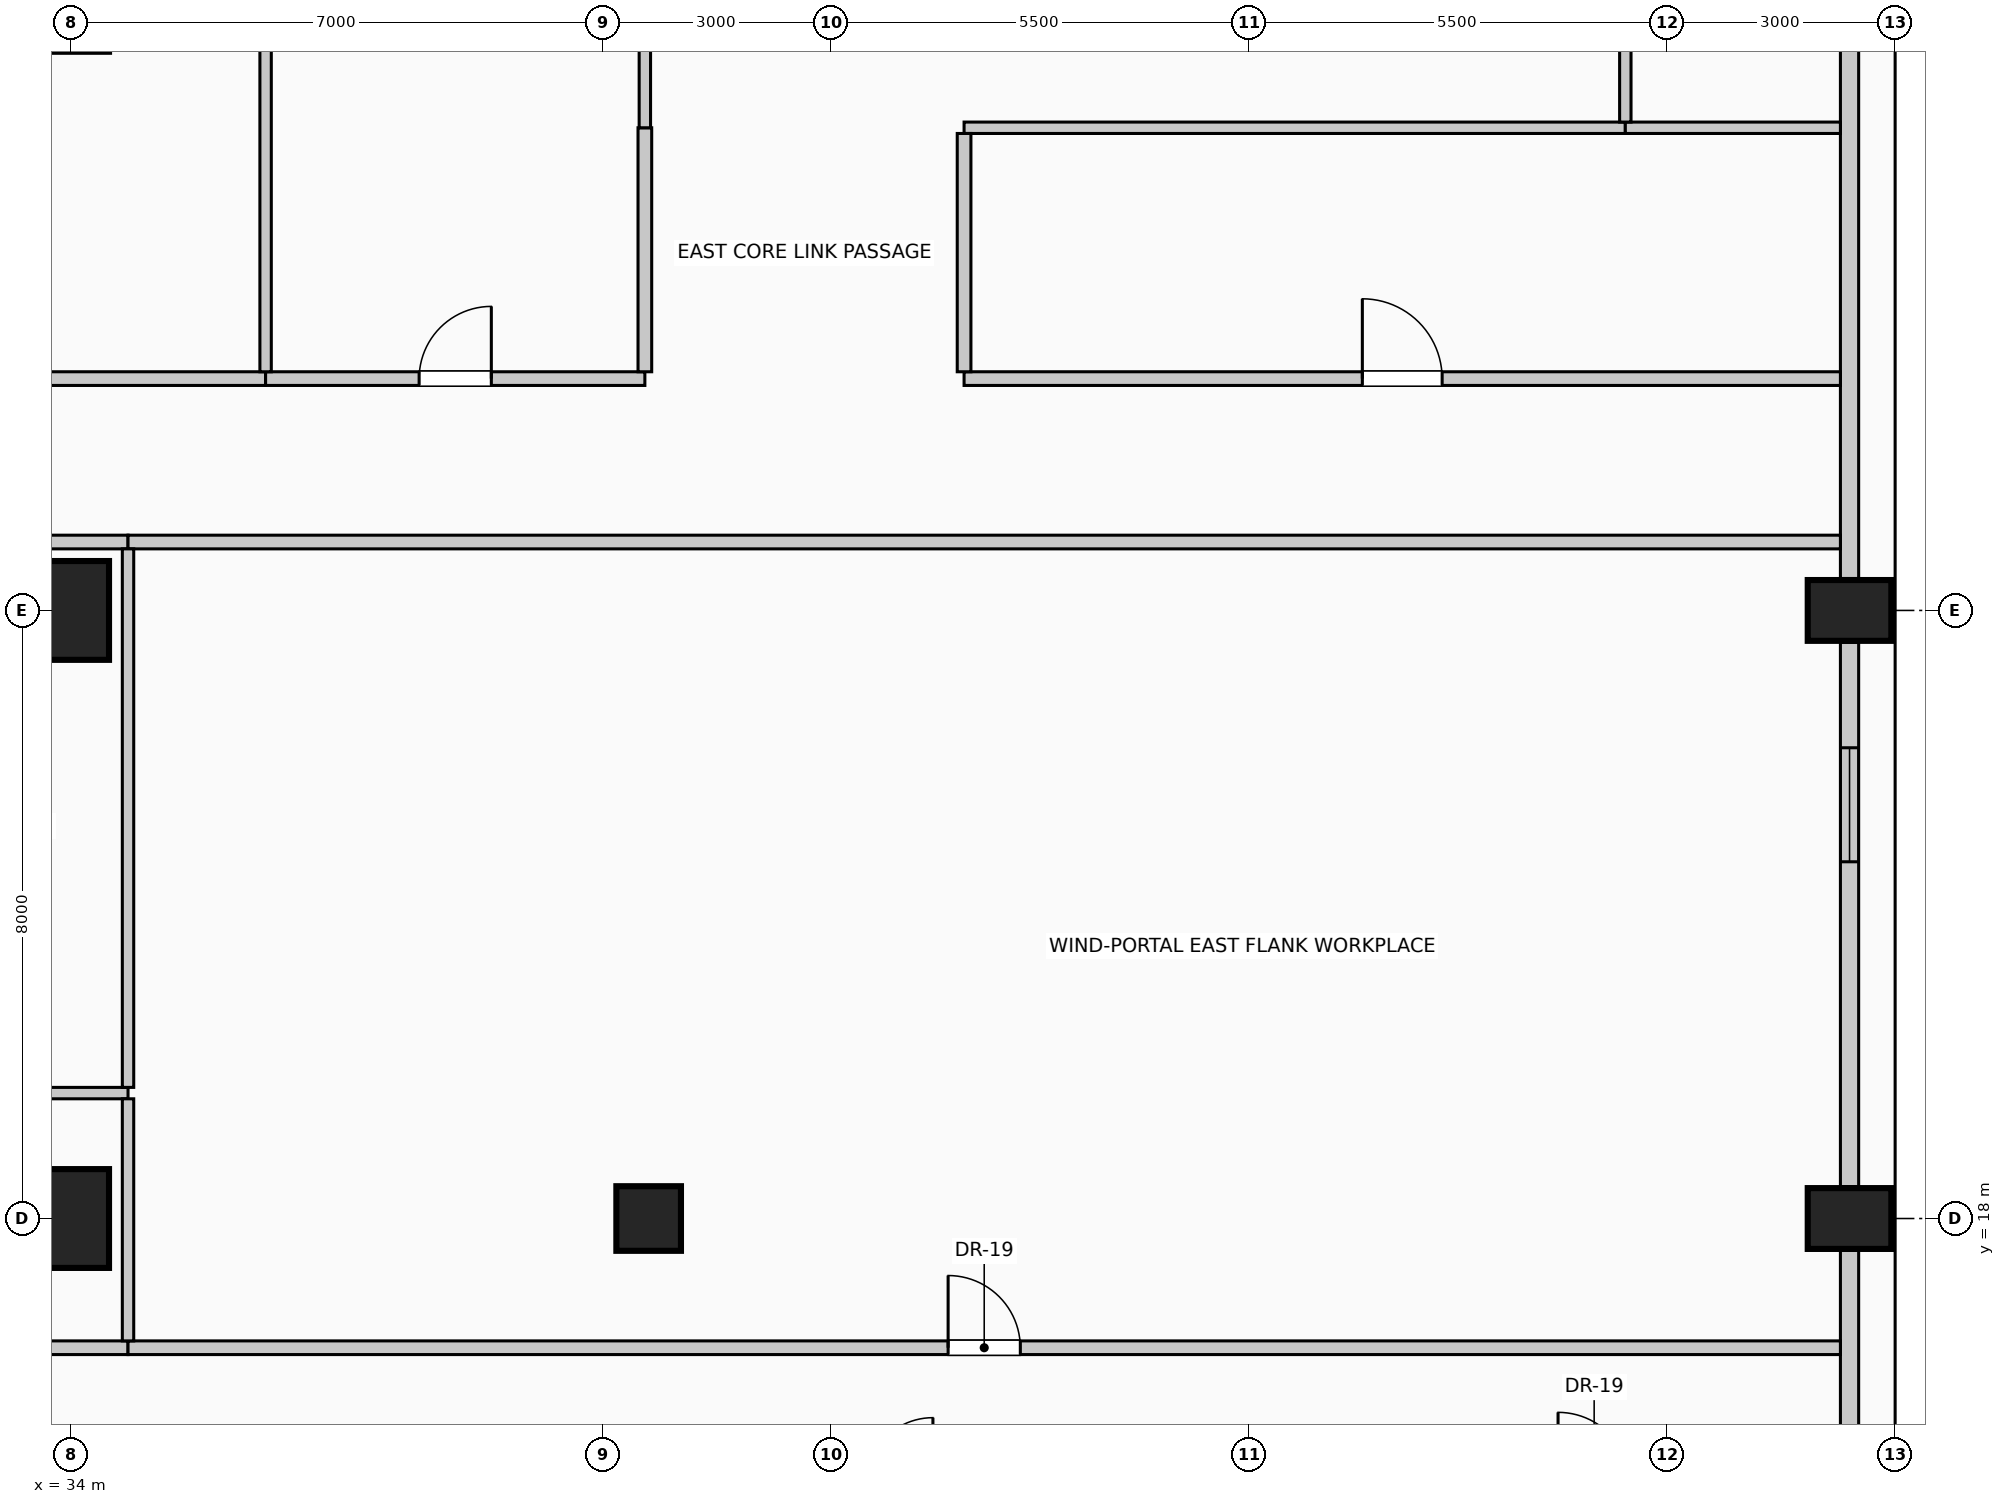
"""IFC4 building model, lengths in metres.
Left out: names, types, materials, properties, quantities, classifications, styles, units other than length and angle.
Written with IfcOpenShell. Run it as: python <this file> out.ifc"""

import sys

from ifc_helpers import new_model, si_unit, direction, frame, frame_2d, origin, origin_2d, place, context, subcontext, project, spatial, rectangle, circle, extrude, element, fill, save


model = new_model("IFC4")
c1 = context("Model", 3, precision=1e-05, world=origin(), true_north=direction((0.0, 1.0)))
c2 = subcontext(c1, "Body", "Model", "MODEL_VIEW")
j1 = project(units=[si_unit("LENGTHUNIT", "METRE"), si_unit("PLANEANGLEUNIT", "RADIAN")], contexts=[c1])
p1 = place(None, origin())
s1 = spatial("IfcSite", under=j1, at=p1, CompositionType="ELEMENT")
p2 = place(p1, origin())
s2 = spatial("IfcBuilding", under=s1, at=p2, CompositionType="ELEMENT")
p3 = place(p2, frame((0.0, 0.0, 218.6)))
s3 = spatial("IfcBuildingStorey", under=s2, at=p3, CompositionType="ELEMENT", Elevation=218.6)
for number, where, z_axis, x_axis in (
    (1, (57.4, 18.0, 0.0), (0.0, 0.0, 1.0), (0.0, 1.0, 0.0)),
    (2, (57.4, 26.0, 0.0), (0.0, 0.0, 1.0), (0.0, 1.0, 0.0)),
):
    element("IfcColumn", number, at=place(p3, frame(where, z_axis=z_axis, x_axis=x_axis)), inside=s3, PredefinedType="COLUMN", context=c2, shape_type="SweptSolid", body=[
        extrude(rectangle(XDim=0.8, YDim=1.1, at=origin_2d()), origin(), (0.0, 0.0, 1.0), 4.0),
    ])
for number, where, z_axis, x_axis in (
    (3, (34.0, 18.0, 0.0), (0.0, 0.0, 1.0), (1.0, 0.0, 0.0)),
    (4, (34.0, 26.0, 0.0), (0.0, 0.0, 1.0), (1.0, 0.0, 0.0)),
    (5, (34.0, 34.0, 0.0), (0.0, 0.0, 1.0), (1.0, 0.0, 0.0)),
):
    element("IfcColumn", number, at=place(p3, frame(where, z_axis=z_axis, x_axis=x_axis)), inside=s3, PredefinedType="COLUMN", context=c2, shape_type="SweptSolid", body=[
        extrude(rectangle(XDim=1.0, YDim=1.3, at=origin_2d()), origin(), (0.0, 0.0, 1.0), 4.0),
    ])
p4 = place(p3, frame((41.6, 18.0, 0.0), z_axis=(0.0, 0.0, 1.0), x_axis=(1.0, 0.0, 0.0)))
e6 = element("IfcColumn", 6, at=p4, inside=s3, PredefinedType="COLUMN", context=c2, shape_type="SweptSolid", body=[
    extrude(circle(Radius=0.425, at=origin_2d()), origin(), (0.0, 0.0, 1.0), 4.0),
])
p5 = place(p3, frame((57.4, 17.58, 0.0), z_axis=(0.0, 0.0, 1.0), x_axis=(0.0, -1.0, 0.0)))
e7 = element("IfcWall", 7, at=p5, inside=s3, PredefinedType="SOLIDWALL", context=c2, shape_type="SweptSolid", body=[
    extrude(rectangle(XDim=7.16, YDim=0.24, at=frame_2d((3.58, 0.0))), origin(), (0.0, 0.0, 1.0), 3.0),
])
p6 = place(p5, frame((4.273, 0.0, 0.42)))
e8 = element("IfcOpeningElement", 8, at=p6, cuts=e7, PredefinedType="OPENING", context=c2, shape_type="SweptSolid", body=[
    extrude(rectangle(XDim=1.5, YDim=2.2, at=frame_2d((0.75, 1.1))), frame((0.0, 0.13, 0.0), z_axis=(0.0, -1.0, 0.0), x_axis=(1.0, 0.0, 0.0)), (0.0, 0.0, 1.0), 0.26),
])
p7 = place(p3, frame((57.4, 25.58, 0.0), z_axis=(0.0, 0.0, 1.0), x_axis=(0.0, -1.0, 0.0)))
e9 = element("IfcWall", 9, at=p7, inside=s3, PredefinedType="SOLIDWALL", context=c2, shape_type="SweptSolid", body=[
    extrude(rectangle(XDim=7.16, YDim=0.24, at=frame_2d((3.58, 0.0))), origin(), (0.0, 0.0, 1.0), 3.0),
])
p8 = place(p7, frame((1.387, 0.0, 0.42)))
e10 = element("IfcOpeningElement", 10, at=p8, cuts=e9, PredefinedType="OPENING", context=c2, shape_type="SweptSolid", body=[
    extrude(rectangle(XDim=1.5, YDim=2.2, at=frame_2d((0.75, 1.1))), frame((0.0, 0.13, 0.0), z_axis=(0.0, -1.0, 0.0), x_axis=(1.0, 0.0, 0.0)), (0.0, 0.0, 1.0), 0.26),
])
p9 = place(p3, frame((57.4, 33.58, 0.0), z_axis=(0.0, 0.0, 1.0), x_axis=(0.0, -1.0, 0.0)))
e11 = element("IfcWall", 11, at=p9, inside=s3, PredefinedType="SOLIDWALL", context=c2, shape_type="SweptSolid", body=[
    extrude(rectangle(XDim=7.16, YDim=0.24, at=frame_2d((3.58, 0.0))), origin(), (0.0, 0.0, 1.0), 3.0),
])
p10 = place(p3, frame((23.1, 16.3, 0.0), z_axis=(0.0, 0.0, 1.0), x_axis=(1.0, 0.0, 0.0)))
e12 = element("IfcWall", 12, at=p10, inside=s3, PredefinedType="PARTITIONING", context=c2, shape_type="SweptSolid", body=[
    extrude(rectangle(XDim=11.65, YDim=0.18, at=frame_2d((5.825, 0.0))), origin(), (0.0, 0.0, 1.0), 3.75),
])
p11 = place(p3, frame((34.75, 16.3, 0.0), z_axis=(0.0, 0.0, 1.0), x_axis=(1.0, 0.0, 0.0)))
e13 = element("IfcWall", 13, at=p11, inside=s3, PredefinedType="PARTITIONING", context=c2, shape_type="SweptSolid", body=[
    extrude(rectangle(XDim=22.53, YDim=0.18, at=frame_2d((11.265, 0.0))), origin(), (0.0, 0.0, 1.0), 3.75),
])
p12 = place(p11, frame((10.79, 0.0, 0.0)))
e14 = element("IfcOpeningElement", 14, at=p12, cuts=e13, PredefinedType="OPENING", context=c2, shape_type="SweptSolid", body=[
    extrude(rectangle(XDim=0.95, YDim=2.15, at=frame_2d((0.475, 1.075))), frame((0.0, 0.1, 0.0), z_axis=(0.0, -1.0, 0.0), x_axis=(1.0, 0.0, 0.0)), (0.0, 0.0, 1.0), 0.2),
])
p13 = place(p3, frame((23.1, 19.65, 0.0), z_axis=(0.0, 0.0, 1.0), x_axis=(1.0, 0.0, 0.0)))
e15 = element("IfcWall", 15, at=p13, inside=s3, PredefinedType="PARTITIONING", context=c2, shape_type="SweptSolid", body=[
    extrude(rectangle(XDim=11.65, YDim=0.15, at=frame_2d((5.825, 0.0))), origin(), (0.0, 0.0, 1.0), 3.75),
])
p14 = place(p3, frame((23.1, 26.9, 0.0), z_axis=(0.0, 0.0, 1.0), x_axis=(1.0, 0.0, 0.0)))
e16 = element("IfcWall", 16, at=p14, inside=s3, PredefinedType="PARTITIONING", context=c2, shape_type="SweptSolid", body=[
    extrude(rectangle(XDim=11.65, YDim=0.18, at=frame_2d((5.825, 0.0))), origin(), (0.0, 0.0, 1.0), 3.75),
])
p15 = place(p14, frame((5.3, 0.0, 0.0)))
e17 = element("IfcOpeningElement", 17, at=p15, cuts=e16, PredefinedType="OPENING", context=c2, shape_type="SweptSolid", body=[
    extrude(rectangle(XDim=1.05, YDim=2.15, at=frame_2d((0.525, 1.075))), frame((0.0, 0.1, 0.0), z_axis=(0.0, -1.0, 0.0), x_axis=(1.0, 0.0, 0.0)), (0.0, 0.0, 1.0), 0.2),
])
p16 = place(p3, frame((34.75, 26.9, 0.0), z_axis=(0.0, 0.0, 1.0), x_axis=(1.0, 0.0, 0.0)))
e18 = element("IfcWall", 18, at=p16, inside=s3, PredefinedType="PARTITIONING", context=c2, shape_type="SweptSolid", body=[
    extrude(rectangle(XDim=22.53, YDim=0.18, at=frame_2d((11.265, 0.0))), origin(), (0.0, 0.0, 1.0), 3.75),
])
p17 = place(p3, frame((28.09, 29.05, 0.0), z_axis=(0.0, 0.0, 1.0), x_axis=(1.0, 0.0, 0.0)))
e19 = element("IfcWall", 19, at=p17, inside=s3, PredefinedType="PARTITIONING", context=c2, shape_type="SweptSolid", body=[
    extrude(rectangle(XDim=8.47, YDim=0.18, at=frame_2d((4.235, 0.0))), origin(), (0.0, 0.0, 1.0), 3.75),
])
p18 = place(p17, frame((3.71, 0.0, 0.0)))
e20 = element("IfcOpeningElement", 20, at=p18, cuts=e19, PredefinedType="OPENING", context=c2, shape_type="SweptSolid", body=[
    extrude(rectangle(XDim=1.05, YDim=2.15, at=frame_2d((0.525, 1.075))), frame((0.0, 0.1, 0.0), z_axis=(0.0, -1.0, 0.0), x_axis=(1.0, 0.0, 0.0)), (0.0, 0.0, 1.0), 0.2),
])
p19 = place(p3, frame((36.56, 29.05, 0.0), z_axis=(0.0, 0.0, 1.0), x_axis=(1.0, 0.0, 0.0)))
e21 = element("IfcWall", 21, at=p19, inside=s3, PredefinedType="PARTITIONING", context=c2, shape_type="SweptSolid", body=[
    extrude(rectangle(XDim=4.99, YDim=0.18, at=frame_2d((2.495, 0.0))), origin(), (0.0, 0.0, 1.0), 3.75),
])
p20 = place(p19, frame((2.02, 0.0, 0.0)))
e22 = element("IfcOpeningElement", 22, at=p20, cuts=e21, PredefinedType="OPENING", context=c2, shape_type="SweptSolid", body=[
    extrude(rectangle(XDim=0.95, YDim=2.15, at=frame_2d((0.475, 1.075))), frame((0.0, 0.1, 0.0), z_axis=(0.0, -1.0, 0.0), x_axis=(1.0, 0.0, 0.0)), (0.0, 0.0, 1.0), 0.2),
])
p21 = place(p3, frame((45.75, 29.05, 0.0), z_axis=(0.0, 0.0, 1.0), x_axis=(1.0, 0.0, 0.0)))
e23 = element("IfcWall", 23, at=p21, inside=s3, PredefinedType="PARTITIONING", context=c2, shape_type="SweptSolid", body=[
    extrude(rectangle(XDim=11.53, YDim=0.18, at=frame_2d((5.765, 0.0))), origin(), (0.0, 0.0, 1.0), 3.75),
])
p22 = place(p21, frame((5.24, 0.0, 0.0)))
e24 = element("IfcOpeningElement", 24, at=p22, cuts=e23, PredefinedType="OPENING", context=c2, shape_type="SweptSolid", body=[
    extrude(rectangle(XDim=1.05, YDim=2.15, at=frame_2d((0.525, 1.075))), frame((0.0, 0.1, 0.0), z_axis=(0.0, -1.0, 0.0), x_axis=(1.0, 0.0, 0.0)), (0.0, 0.0, 1.0), 0.2),
])
p23 = place(p3, frame((45.75, 32.35, 0.0), z_axis=(0.0, 0.0, 1.0), x_axis=(1.0, 0.0, 0.0)))
e25 = element("IfcWall", 25, at=p23, inside=s3, PredefinedType="PARTITIONING", context=c2, shape_type="SweptSolid", body=[
    extrude(rectangle(XDim=8.7, YDim=0.15, at=frame_2d((4.35, 0.0))), origin(), (0.0, 0.0, 1.0), 3.75),
])
p24 = place(p3, frame((54.45, 32.35, 0.0), z_axis=(0.0, 0.0, 1.0), x_axis=(1.0, 0.0, 0.0)))
e26 = element("IfcWall", 26, at=p24, inside=s3, PredefinedType="PARTITIONING", context=c2, shape_type="SweptSolid", body=[
    extrude(rectangle(XDim=2.83, YDim=0.15, at=frame_2d((1.415, 0.0))), origin(), (0.0, 0.0, 1.0), 3.75),
])
p25 = place(p3, frame((34.75, 16.39, 0.0), z_axis=(0.0, 0.0, 1.0), x_axis=(0.0, 1.0, 0.0)))
e27 = element("IfcWall", 27, at=p25, inside=s3, PredefinedType="PARTITIONING", context=c2, shape_type="SweptSolid", body=[
    extrude(rectangle(XDim=3.185, YDim=0.15, at=frame_2d((1.593, 0.0))), origin(), (0.0, 0.0, 1.0), 3.75),
])
p26 = place(p3, frame((34.75, 19.725, 0.0), z_axis=(0.0, 0.0, 1.0), x_axis=(0.0, 1.0, 0.0)))
e28 = element("IfcWall", 28, at=p26, inside=s3, PredefinedType="PARTITIONING", context=c2, shape_type="SweptSolid", body=[
    extrude(rectangle(XDim=7.085, YDim=0.15, at=frame_2d((3.542, 0.0))), origin(), (0.0, 0.0, 1.0), 3.75),
])
p27 = place(p3, frame((36.56, 29.14, 0.0), z_axis=(0.0, 0.0, 1.0), x_axis=(0.0, 1.0, 0.0)))
e29 = element("IfcWall", 29, at=p27, inside=s3, PredefinedType="PARTITIONING", context=c2, shape_type="SweptSolid", body=[
    extrude(rectangle(XDim=16.14, YDim=0.15, at=frame_2d((8.07, 0.0))), origin(), (0.0, 0.0, 1.0), 3.75),
])
p28 = place(p3, frame((41.55, 29.14, 0.0), z_axis=(0.0, 0.0, 1.0), x_axis=(0.0, 1.0, 0.0)))
e30 = element("IfcWall", 30, at=p28, inside=s3, PredefinedType="PARTITIONING", context=c2, shape_type="SweptSolid", body=[
    extrude(rectangle(XDim=3.21, YDim=0.18, at=frame_2d((1.605, 0.0))), origin(), (0.0, 0.0, 1.0), 3.145),
])
p29 = place(p3, frame((41.55, 32.35, 0.0), z_axis=(0.0, 0.0, 1.0), x_axis=(0.0, 1.0, 0.0)))
e31 = element("IfcWall", 31, at=p29, inside=s3, PredefinedType="PARTITIONING", context=c2, shape_type="SweptSolid", body=[
    extrude(rectangle(XDim=1.225, YDim=0.15, at=frame_2d((0.612, 0.0))), origin(), (0.0, 0.0, 1.0), 3.145),
])
p30 = place(p3, frame((45.75, 29.14, 0.0), z_axis=(0.0, 0.0, 1.0), x_axis=(0.0, 1.0, 0.0)))
e32 = element("IfcWall", 32, at=p30, inside=s3, PredefinedType="PARTITIONING", context=c2, shape_type="SweptSolid", body=[
    extrude(rectangle(XDim=3.135, YDim=0.18, at=frame_2d((1.567, 0.0))), origin(), (0.0, 0.0, 1.0), 3.75),
])
p31 = place(p3, frame((54.45, 32.425, 0.0), z_axis=(0.0, 0.0, 1.0), x_axis=(0.0, 1.0, 0.0)))
e33 = element("IfcWall", 33, at=p31, inside=s3, PredefinedType="PARTITIONING", context=c2, shape_type="SweptSolid", body=[
    extrude(rectangle(XDim=1.725, YDim=0.15, at=frame_2d((0.862, 0.0))), origin(), (0.0, 0.0, 1.0), 3.75),
])
p32 = place(p8, origin())
e34 = element("IfcWindow", 34, at=p32, inside=s3, PartitioningType="SINGLE_PANEL", PredefinedType="WINDOW", context=c2, shape_type="SweptSolid", body=[
    extrude(rectangle(XDim=1.5, YDim=2.2, at=frame_2d((0.75, 1.1))), frame((0.0, 0.03, 0.0), z_axis=(0.0, -1.0, 0.0), x_axis=(1.0, 0.0, 0.0)), (0.0, 0.0, 1.0), 0.06),
])
fill(e10, e34)
p33 = place(p12, origin())
e35 = element("IfcDoor", 35, at=p33, inside=s3, OperationType="SINGLE_SWING_LEFT", PredefinedType="DOOR", context=c2, shape_type="SweptSolid", body=[
    extrude(rectangle(XDim=0.95, YDim=2.15, at=frame_2d((0.475, 1.075))), frame((0.0, 0.025, 0.0), z_axis=(0.0, -1.0, 0.0), x_axis=(1.0, 0.0, 0.0)), (0.0, 0.0, 1.0), 0.05),
])
fill(e14, e35)
p34 = place(p20, origin())
e36 = element("IfcDoor", 36, at=p34, inside=s3, OperationType="SINGLE_SWING_RIGHT", PredefinedType="DOOR", context=c2, shape_type="SweptSolid", body=[
    extrude(rectangle(XDim=0.95, YDim=2.15, at=frame_2d((0.475, 1.075))), frame((0.0, 0.025, 0.0), z_axis=(0.0, -1.0, 0.0), x_axis=(1.0, 0.0, 0.0)), (0.0, 0.0, 1.0), 0.05),
])
fill(e22, e36)
p35 = place(p22, origin())
e37 = element("IfcDoor", 37, at=p35, inside=s3, OperationType="SINGLE_SWING_LEFT", PredefinedType="DOOR", context=c2, shape_type="SweptSolid", body=[
    extrude(rectangle(XDim=1.05, YDim=2.15, at=frame_2d((0.525, 1.075))), frame((0.0, 0.025, 0.0), z_axis=(0.0, -1.0, 0.0), x_axis=(1.0, 0.0, 0.0)), (0.0, 0.0, 1.0), 0.05),
])
fill(e24, e37)
save(model, sys.argv[1])
